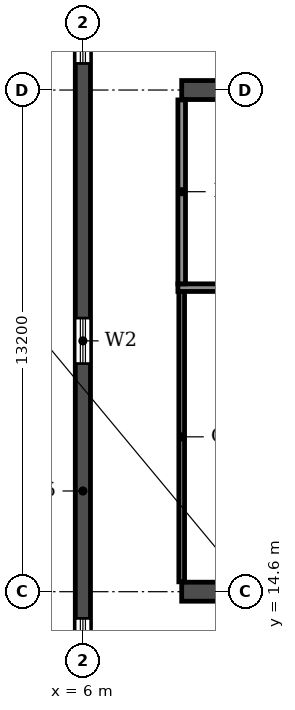
"""IFC4 building model, lengths in metres.
Left out: names, types, materials, properties, quantities, classifications, styles, units other than length and angle.
Written with IfcOpenShell. Run it as: python <this file> out.ifc"""

import sys

from ifc_helpers import new_model, si_unit, direction, frame, frame_2d, origin, place, context, subcontext, project, spatial, rectangle, extrude, element, fill, save


model = new_model("IFC4")
c1 = context("Model", 3, precision=1e-05, world=origin(), true_north=direction((0.0, 1.0)))
c2 = subcontext(c1, "Body", "Model", "MODEL_VIEW")
j1 = project(units=[si_unit("LENGTHUNIT", "METRE"), si_unit("PLANEANGLEUNIT", "RADIAN")], contexts=[c1])
p1 = place(None, origin())
s1 = spatial("IfcSite", under=j1, at=p1, CompositionType="ELEMENT")
p2 = place(p1, origin())
s2 = spatial("IfcBuilding", under=s1, at=p2, CompositionType="ELEMENT")
p3 = place(p2, frame((0.0, 0.0, 72.9)))
s3 = spatial("IfcBuildingStorey", under=s2, at=p3, CompositionType="ELEMENT", Elevation=72.9)
p4 = place(p3, frame((6.0, 4.683, 0.0), z_axis=(0.0, 0.0, 1.0), x_axis=(0.0, 1.0, 0.0)))
e1 = element("IfcWall", 1, at=p4, inside=s3, PredefinedType="SHEAR", context=c2, shape_type="SweptSolid", body=[
    extrude(rectangle(XDim=34.234, YDim=0.4, at=frame_2d((17.117, 0.0))), origin(), (0.0, 0.0, 1.0), 3.06),
])
p5 = place(p4, frame((23.817, 0.0, 0.9)))
e2 = element("IfcOpeningElement", 2, at=p5, cuts=e1, PredefinedType="OPENING", context=c2, shape_type="SweptSolid", body=[
    extrude(rectangle(XDim=1.2, YDim=1.5, at=frame_2d((0.6, 0.75))), frame((0.0, 0.21, 0.0), z_axis=(0.0, -1.0, 0.0), x_axis=(1.0, 0.0, 0.0)), (0.0, 0.0, 1.0), 0.42),
])
p6 = place(p4, frame((8.017, 0.0, 0.9)))
e3 = element("IfcOpeningElement", 3, at=p6, cuts=e1, PredefinedType="OPENING", context=c2, shape_type="SweptSolid", body=[
    extrude(rectangle(XDim=1.2, YDim=1.5, at=frame_2d((0.6, 0.75))), frame((0.0, 0.21, 0.0), z_axis=(0.0, -1.0, 0.0), x_axis=(1.0, 0.0, 0.0)), (0.0, 0.0, 1.0), 0.42),
])
p7 = place(p4, frame((15.917, 0.0, 0.9)))
e4 = element("IfcOpeningElement", 4, at=p7, cuts=e1, PredefinedType="OPENING", context=c2, shape_type="SweptSolid", body=[
    extrude(rectangle(XDim=1.2, YDim=1.5, at=frame_2d((0.6, 0.75))), frame((0.0, 0.21, 0.0), z_axis=(0.0, -1.0, 0.0), x_axis=(1.0, 0.0, 0.0)), (0.0, 0.0, 1.0), 0.42),
])
p8 = place(p4, frame((28.894, 0.0, 0.6)))
e5 = element("IfcOpeningElement", 5, at=p8, cuts=e1, PredefinedType="OPENING", context=c2, shape_type="SweptSolid", body=[
    extrude(rectangle(XDim=2.2, YDim=1.8, at=frame_2d((1.1, 0.9))), frame((0.0, 0.21, 0.0), z_axis=(0.0, -1.0, 0.0), x_axis=(1.0, 0.0, 0.0)), (0.0, 0.0, 1.0), 0.42),
])
p9 = place(p4, frame((2.541, 0.0, 0.6)))
e6 = element("IfcOpeningElement", 6, at=p9, cuts=e1, PredefinedType="OPENING", context=c2, shape_type="SweptSolid", body=[
    extrude(rectangle(XDim=2.2, YDim=1.8, at=frame_2d((1.1, 0.9))), frame((0.0, 0.21, 0.0), z_axis=(0.0, -1.0, 0.0), x_axis=(1.0, 0.0, 0.0)), (0.0, 0.0, 1.0), 0.42),
])
p10 = place(p3, frame((8.6, 14.6, 0.0), z_axis=(0.0, 0.0, 1.0), x_axis=(1.0, 0.0, 0.0)))
e7 = element("IfcWall", 7, at=p10, inside=s3, PredefinedType="SOLIDWALL", context=c2, shape_type="SweptSolid", body=[
    extrude(rectangle(XDim=84.8, YDim=0.5, at=frame_2d((42.4, 0.0))), origin(), (0.0, 0.0, 1.0), 3.06),
])
p11 = place(p10, frame((2.25, 0.0, 0.0)))
e8 = element("IfcOpeningElement", 8, at=p11, cuts=e7, PredefinedType="OPENING", context=c2, shape_type="SweptSolid", body=[
    extrude(rectangle(XDim=1.0, YDim=2.1, at=frame_2d((0.5, 1.05))), frame((0.0, 0.26, 0.0), z_axis=(0.0, -1.0, 0.0), x_axis=(1.0, 0.0, 0.0)), (0.0, 0.0, 1.0), 0.52),
])
p12 = place(p10, frame((6.95, 0.0, 0.0)))
e9 = element("IfcOpeningElement", 9, at=p12, cuts=e7, PredefinedType="OPENING", context=c2, shape_type="SweptSolid", body=[
    extrude(rectangle(XDim=1.0, YDim=2.1, at=frame_2d((0.5, 1.05))), frame((0.0, 0.26, 0.0), z_axis=(0.0, -1.0, 0.0), x_axis=(1.0, 0.0, 0.0)), (0.0, 0.0, 1.0), 0.52),
])
p13 = place(p10, frame((10.3, 0.0, 0.0)))
e10 = element("IfcOpeningElement", 10, at=p13, cuts=e7, PredefinedType="OPENING", context=c2, shape_type="SweptSolid", body=[
    extrude(rectangle(XDim=1.0, YDim=2.1, at=frame_2d((0.5, 1.05))), frame((0.0, 0.26, 0.0), z_axis=(0.0, -1.0, 0.0), x_axis=(1.0, 0.0, 0.0)), (0.0, 0.0, 1.0), 0.52),
])
p14 = place(p10, frame((18.2, 0.0, 0.0)))
e11 = element("IfcOpeningElement", 11, at=p14, cuts=e7, PredefinedType="OPENING", context=c2, shape_type="SweptSolid", body=[
    extrude(rectangle(XDim=1.0, YDim=2.1, at=frame_2d((0.5, 1.05))), frame((0.0, 0.26, 0.0), z_axis=(0.0, -1.0, 0.0), x_axis=(1.0, 0.0, 0.0)), (0.0, 0.0, 1.0), 0.52),
])
p15 = place(p10, frame((22.8, 0.0, 0.0)))
e12 = element("IfcOpeningElement", 12, at=p15, cuts=e7, PredefinedType="OPENING", context=c2, shape_type="SweptSolid", body=[
    extrude(rectangle(XDim=1.0, YDim=2.1, at=frame_2d((0.5, 1.05))), frame((0.0, 0.26, 0.0), z_axis=(0.0, -1.0, 0.0), x_axis=(1.0, 0.0, 0.0)), (0.0, 0.0, 1.0), 0.52),
])
p16 = place(p10, frame((35.4, 0.0, 0.0)))
e13 = element("IfcOpeningElement", 13, at=p16, cuts=e7, PredefinedType="OPENING", context=c2, shape_type="SweptSolid", body=[
    extrude(rectangle(XDim=1.0, YDim=2.1, at=frame_2d((0.5, 1.05))), frame((0.0, 0.26, 0.0), z_axis=(0.0, -1.0, 0.0), x_axis=(1.0, 0.0, 0.0)), (0.0, 0.0, 1.0), 0.52),
])
p17 = place(p10, frame((39.3, 0.0, 0.0)))
e14 = element("IfcOpeningElement", 14, at=p17, cuts=e7, PredefinedType="OPENING", context=c2, shape_type="SweptSolid", body=[
    extrude(rectangle(XDim=1.0, YDim=2.1, at=frame_2d((0.5, 1.05))), frame((0.0, 0.26, 0.0), z_axis=(0.0, -1.0, 0.0), x_axis=(1.0, 0.0, 0.0)), (0.0, 0.0, 1.0), 0.52),
])
p18 = place(p10, frame((41.9, 0.0, 0.0)))
e15 = element("IfcOpeningElement", 15, at=p18, cuts=e7, PredefinedType="OPENING", context=c2, shape_type="SweptSolid", body=[
    extrude(rectangle(XDim=1.0, YDim=2.1, at=frame_2d((0.5, 1.05))), frame((0.0, 0.26, 0.0), z_axis=(0.0, -1.0, 0.0), x_axis=(1.0, 0.0, 0.0)), (0.0, 0.0, 1.0), 0.52),
])
p19 = place(p10, frame((44.5, 0.0, 0.0)))
e16 = element("IfcOpeningElement", 16, at=p19, cuts=e7, PredefinedType="OPENING", context=c2, shape_type="SweptSolid", body=[
    extrude(rectangle(XDim=1.0, YDim=2.1, at=frame_2d((0.5, 1.05))), frame((0.0, 0.26, 0.0), z_axis=(0.0, -1.0, 0.0), x_axis=(1.0, 0.0, 0.0)), (0.0, 0.0, 1.0), 0.52),
])
p20 = place(p10, frame((48.4, 0.0, 0.0)))
e17 = element("IfcOpeningElement", 17, at=p20, cuts=e7, PredefinedType="OPENING", context=c2, shape_type="SweptSolid", body=[
    extrude(rectangle(XDim=1.0, YDim=2.1, at=frame_2d((0.5, 1.05))), frame((0.0, 0.26, 0.0), z_axis=(0.0, -1.0, 0.0), x_axis=(1.0, 0.0, 0.0)), (0.0, 0.0, 1.0), 0.52),
])
p21 = place(p10, frame((61.0, 0.0, 0.0)))
e18 = element("IfcOpeningElement", 18, at=p21, cuts=e7, PredefinedType="OPENING", context=c2, shape_type="SweptSolid", body=[
    extrude(rectangle(XDim=1.0, YDim=2.1, at=frame_2d((0.5, 1.05))), frame((0.0, 0.26, 0.0), z_axis=(0.0, -1.0, 0.0), x_axis=(1.0, 0.0, 0.0)), (0.0, 0.0, 1.0), 0.52),
])
p22 = place(p10, frame((65.6, 0.0, 0.0)))
e19 = element("IfcOpeningElement", 19, at=p22, cuts=e7, PredefinedType="OPENING", context=c2, shape_type="SweptSolid", body=[
    extrude(rectangle(XDim=1.0, YDim=2.1, at=frame_2d((0.5, 1.05))), frame((0.0, 0.26, 0.0), z_axis=(0.0, -1.0, 0.0), x_axis=(1.0, 0.0, 0.0)), (0.0, 0.0, 1.0), 0.52),
])
p23 = place(p10, frame((73.5, 0.0, 0.0)))
e20 = element("IfcOpeningElement", 20, at=p23, cuts=e7, PredefinedType="OPENING", context=c2, shape_type="SweptSolid", body=[
    extrude(rectangle(XDim=1.0, YDim=2.1, at=frame_2d((0.5, 1.05))), frame((0.0, 0.26, 0.0), z_axis=(0.0, -1.0, 0.0), x_axis=(1.0, 0.0, 0.0)), (0.0, 0.0, 1.0), 0.52),
])
p24 = place(p10, frame((76.55, 0.0, 0.0)))
e21 = element("IfcOpeningElement", 21, at=p24, cuts=e7, PredefinedType="OPENING", context=c2, shape_type="SweptSolid", body=[
    extrude(rectangle(XDim=1.0, YDim=2.1, at=frame_2d((0.5, 1.05))), frame((0.0, 0.26, 0.0), z_axis=(0.0, -1.0, 0.0), x_axis=(1.0, 0.0, 0.0)), (0.0, 0.0, 1.0), 0.52),
])
p25 = place(p10, frame((81.0, 0.0, 0.0)))
e22 = element("IfcOpeningElement", 22, at=p25, cuts=e7, PredefinedType="OPENING", context=c2, shape_type="SweptSolid", body=[
    extrude(rectangle(XDim=1.5, YDim=2.1, at=frame_2d((0.75, 1.05))), frame((0.0, 0.26, 0.0), z_axis=(0.0, -1.0, 0.0), x_axis=(1.0, 0.0, 0.0)), (0.0, 0.0, 1.0), 0.52),
])
p26 = place(p3, frame((8.6, 27.8, 0.0), z_axis=(0.0, 0.0, 1.0), x_axis=(1.0, 0.0, 0.0)))
e23 = element("IfcWall", 23, at=p26, inside=s3, PredefinedType="SOLIDWALL", context=c2, shape_type="SweptSolid", body=[
    extrude(rectangle(XDim=84.8, YDim=0.5, at=frame_2d((42.4, 0.0))), origin(), (0.0, 0.0, 1.0), 3.06),
])
p27 = place(p26, frame((2.0, 0.0, 0.0)))
e24 = element("IfcOpeningElement", 24, at=p27, cuts=e23, PredefinedType="OPENING", context=c2, shape_type="SweptSolid", body=[
    extrude(rectangle(XDim=1.5, YDim=2.1, at=frame_2d((0.75, 1.05))), frame((0.0, 0.26, 0.0), z_axis=(0.0, -1.0, 0.0), x_axis=(1.0, 0.0, 0.0)), (0.0, 0.0, 1.0), 0.52),
])
p28 = place(p26, frame((6.95, 0.0, 0.0)))
e25 = element("IfcOpeningElement", 25, at=p28, cuts=e23, PredefinedType="OPENING", context=c2, shape_type="SweptSolid", body=[
    extrude(rectangle(XDim=1.0, YDim=2.1, at=frame_2d((0.5, 1.05))), frame((0.0, 0.26, 0.0), z_axis=(0.0, -1.0, 0.0), x_axis=(1.0, 0.0, 0.0)), (0.0, 0.0, 1.0), 0.52),
])
p29 = place(p26, frame((10.3, 0.0, 0.0)))
e26 = element("IfcOpeningElement", 26, at=p29, cuts=e23, PredefinedType="OPENING", context=c2, shape_type="SweptSolid", body=[
    extrude(rectangle(XDim=1.0, YDim=2.1, at=frame_2d((0.5, 1.05))), frame((0.0, 0.26, 0.0), z_axis=(0.0, -1.0, 0.0), x_axis=(1.0, 0.0, 0.0)), (0.0, 0.0, 1.0), 0.52),
])
p30 = place(p26, frame((13.65, 0.0, 0.0)))
e27 = element("IfcOpeningElement", 27, at=p30, cuts=e23, PredefinedType="OPENING", context=c2, shape_type="SweptSolid", body=[
    extrude(rectangle(XDim=0.9, YDim=2.1, at=frame_2d((0.45, 1.05))), frame((0.0, 0.26, 0.0), z_axis=(0.0, -1.0, 0.0), x_axis=(1.0, 0.0, 0.0)), (0.0, 0.0, 1.0), 0.52),
])
p31 = place(p26, frame((22.85, 0.0, 0.0)))
e28 = element("IfcOpeningElement", 28, at=p31, cuts=e23, PredefinedType="OPENING", context=c2, shape_type="SweptSolid", body=[
    extrude(rectangle(XDim=0.9, YDim=2.1, at=frame_2d((0.45, 1.05))), frame((0.0, 0.26, 0.0), z_axis=(0.0, -1.0, 0.0), x_axis=(1.0, 0.0, 0.0)), (0.0, 0.0, 1.0), 0.52),
])
p32 = place(p26, frame((26.0, 0.0, 0.0)))
e29 = element("IfcOpeningElement", 29, at=p32, cuts=e23, PredefinedType="OPENING", context=c2, shape_type="SweptSolid", body=[
    extrude(rectangle(XDim=1.0, YDim=2.1, at=frame_2d((0.5, 1.05))), frame((0.0, 0.26, 0.0), z_axis=(0.0, -1.0, 0.0), x_axis=(1.0, 0.0, 0.0)), (0.0, 0.0, 1.0), 0.52),
])
p33 = place(p26, frame((31.2, 0.0, 0.0)))
e30 = element("IfcOpeningElement", 30, at=p33, cuts=e23, PredefinedType="OPENING", context=c2, shape_type="SweptSolid", body=[
    extrude(rectangle(XDim=1.0, YDim=2.1, at=frame_2d((0.5, 1.05))), frame((0.0, 0.26, 0.0), z_axis=(0.0, -1.0, 0.0), x_axis=(1.0, 0.0, 0.0)), (0.0, 0.0, 1.0), 0.52),
])
p34 = place(p26, frame((39.0, 0.0, 0.0)))
e31 = element("IfcOpeningElement", 31, at=p34, cuts=e23, PredefinedType="OPENING", context=c2, shape_type="SweptSolid", body=[
    extrude(rectangle(XDim=1.0, YDim=2.1, at=frame_2d((0.5, 1.05))), frame((0.0, 0.26, 0.0), z_axis=(0.0, -1.0, 0.0), x_axis=(1.0, 0.0, 0.0)), (0.0, 0.0, 1.0), 0.52),
])
p35 = place(p26, frame((41.9, 0.0, 0.0)))
e32 = element("IfcOpeningElement", 32, at=p35, cuts=e23, PredefinedType="OPENING", context=c2, shape_type="SweptSolid", body=[
    extrude(rectangle(XDim=1.0, YDim=2.1, at=frame_2d((0.5, 1.05))), frame((0.0, 0.26, 0.0), z_axis=(0.0, -1.0, 0.0), x_axis=(1.0, 0.0, 0.0)), (0.0, 0.0, 1.0), 0.52),
])
p36 = place(p26, frame((44.8, 0.0, 0.0)))
e33 = element("IfcOpeningElement", 33, at=p36, cuts=e23, PredefinedType="OPENING", context=c2, shape_type="SweptSolid", body=[
    extrude(rectangle(XDim=1.0, YDim=2.1, at=frame_2d((0.5, 1.05))), frame((0.0, 0.26, 0.0), z_axis=(0.0, -1.0, 0.0), x_axis=(1.0, 0.0, 0.0)), (0.0, 0.0, 1.0), 0.52),
])
p37 = place(p26, frame((48.7, 0.0, 0.0)))
e34 = element("IfcOpeningElement", 34, at=p37, cuts=e23, PredefinedType="OPENING", context=c2, shape_type="SweptSolid", body=[
    extrude(rectangle(XDim=1.0, YDim=2.1, at=frame_2d((0.5, 1.05))), frame((0.0, 0.26, 0.0), z_axis=(0.0, -1.0, 0.0), x_axis=(1.0, 0.0, 0.0)), (0.0, 0.0, 1.0), 0.52),
])
p38 = place(p26, frame((55.2, 0.0, 0.0)))
e35 = element("IfcOpeningElement", 35, at=p38, cuts=e23, PredefinedType="OPENING", context=c2, shape_type="SweptSolid", body=[
    extrude(rectangle(XDim=1.0, YDim=2.1, at=frame_2d((0.5, 1.05))), frame((0.0, 0.26, 0.0), z_axis=(0.0, -1.0, 0.0), x_axis=(1.0, 0.0, 0.0)), (0.0, 0.0, 1.0), 0.52),
])
p39 = place(p26, frame((61.05, 0.0, 0.0)))
e36 = element("IfcOpeningElement", 36, at=p39, cuts=e23, PredefinedType="OPENING", context=c2, shape_type="SweptSolid", body=[
    extrude(rectangle(XDim=0.9, YDim=2.1, at=frame_2d((0.45, 1.05))), frame((0.0, 0.26, 0.0), z_axis=(0.0, -1.0, 0.0), x_axis=(1.0, 0.0, 0.0)), (0.0, 0.0, 1.0), 0.52),
])
p40 = place(p26, frame((70.25, 0.0, 0.0)))
e37 = element("IfcOpeningElement", 37, at=p40, cuts=e23, PredefinedType="OPENING", context=c2, shape_type="SweptSolid", body=[
    extrude(rectangle(XDim=0.9, YDim=2.1, at=frame_2d((0.45, 1.05))), frame((0.0, 0.26, 0.0), z_axis=(0.0, -1.0, 0.0), x_axis=(1.0, 0.0, 0.0)), (0.0, 0.0, 1.0), 0.52),
])
p41 = place(p26, frame((73.5, 0.0, 0.0)))
e38 = element("IfcOpeningElement", 38, at=p41, cuts=e23, PredefinedType="OPENING", context=c2, shape_type="SweptSolid", body=[
    extrude(rectangle(XDim=1.0, YDim=2.1, at=frame_2d((0.5, 1.05))), frame((0.0, 0.26, 0.0), z_axis=(0.0, -1.0, 0.0), x_axis=(1.0, 0.0, 0.0)), (0.0, 0.0, 1.0), 0.52),
])
p42 = place(p26, frame((76.25, 0.0, 0.0)))
e39 = element("IfcOpeningElement", 39, at=p42, cuts=e23, PredefinedType="OPENING", context=c2, shape_type="SweptSolid", body=[
    extrude(rectangle(XDim=1.0, YDim=2.1, at=frame_2d((0.5, 1.05))), frame((0.0, 0.26, 0.0), z_axis=(0.0, -1.0, 0.0), x_axis=(1.0, 0.0, 0.0)), (0.0, 0.0, 1.0), 0.52),
])
p43 = place(p26, frame((80.95, 0.0, 0.0)))
e40 = element("IfcOpeningElement", 40, at=p43, cuts=e23, PredefinedType="OPENING", context=c2, shape_type="SweptSolid", body=[
    extrude(rectangle(XDim=1.0, YDim=2.1, at=frame_2d((0.5, 1.05))), frame((0.0, 0.26, 0.0), z_axis=(0.0, -1.0, 0.0), x_axis=(1.0, 0.0, 0.0)), (0.0, 0.0, 1.0), 0.52),
])
p44 = place(p3, frame((8.6, 14.86, 0.0), z_axis=(0.0, 0.0, 1.0), x_axis=(0.0, 1.0, 0.0)))
e41 = element("IfcWall", 41, at=p44, inside=s3, PredefinedType="PARTITIONING", context=c2, shape_type="SweptSolid", body=[
    extrude(rectangle(XDim=7.64, YDim=0.15, at=frame_2d((3.82, 0.0))), origin(), (0.0, 0.0, 1.0), 3.06),
])
p45 = place(p3, frame((8.5, 22.6, 0.0), z_axis=(0.0, 0.0, 1.0), x_axis=(1.0, 0.0, 0.0)))
e42 = element("IfcWall", 42, at=p45, inside=s3, PredefinedType="PARTITIONING", context=c2, shape_type="SweptSolid", body=[
    extrude(rectangle(XDim=5.7, YDim=0.2, at=frame_2d((2.85, 0.0))), origin(), (0.0, 0.0, 1.0), 3.06),
])
p46 = place(p3, frame((8.6, 22.7, 0.0), z_axis=(0.0, 0.0, 1.0), x_axis=(0.0, 1.0, 0.0)))
e43 = element("IfcWall", 43, at=p46, inside=s3, PredefinedType="PARTITIONING", context=c2, shape_type="SweptSolid", body=[
    extrude(rectangle(XDim=4.84, YDim=0.2, at=frame_2d((2.42, 0.0))), origin(), (0.0, 0.0, 1.0), 3.06),
])
p47 = place(p5, origin())
e44 = element("IfcWindow", 44, at=p47, inside=s3, PartitioningType="SINGLE_PANEL", PredefinedType="WINDOW", context=c2, shape_type="SweptSolid", body=[
    extrude(rectangle(XDim=1.2, YDim=1.5, at=frame_2d((0.6, 0.75))), frame((0.0, 0.03, 0.0), z_axis=(0.0, -1.0, 0.0), x_axis=(1.0, 0.0, 0.0)), (0.0, 0.0, 1.0), 0.06),
])
fill(e2, e44)
p48 = place(p6, origin())
e45 = element("IfcWindow", 45, at=p48, inside=s3, PartitioningType="SINGLE_PANEL", PredefinedType="WINDOW", context=c2, shape_type="SweptSolid", body=[
    extrude(rectangle(XDim=1.2, YDim=1.5, at=frame_2d((0.6, 0.75))), frame((0.0, 0.03, 0.0), z_axis=(0.0, -1.0, 0.0), x_axis=(1.0, 0.0, 0.0)), (0.0, 0.0, 1.0), 0.06),
])
fill(e3, e45)
p49 = place(p7, origin())
e46 = element("IfcWindow", 46, at=p49, inside=s3, PartitioningType="SINGLE_PANEL", PredefinedType="WINDOW", context=c2, shape_type="SweptSolid", body=[
    extrude(rectangle(XDim=1.2, YDim=1.5, at=frame_2d((0.6, 0.75))), frame((0.0, 0.03, 0.0), z_axis=(0.0, -1.0, 0.0), x_axis=(1.0, 0.0, 0.0)), (0.0, 0.0, 1.0), 0.06),
])
fill(e4, e46)
save(model, sys.argv[1])
